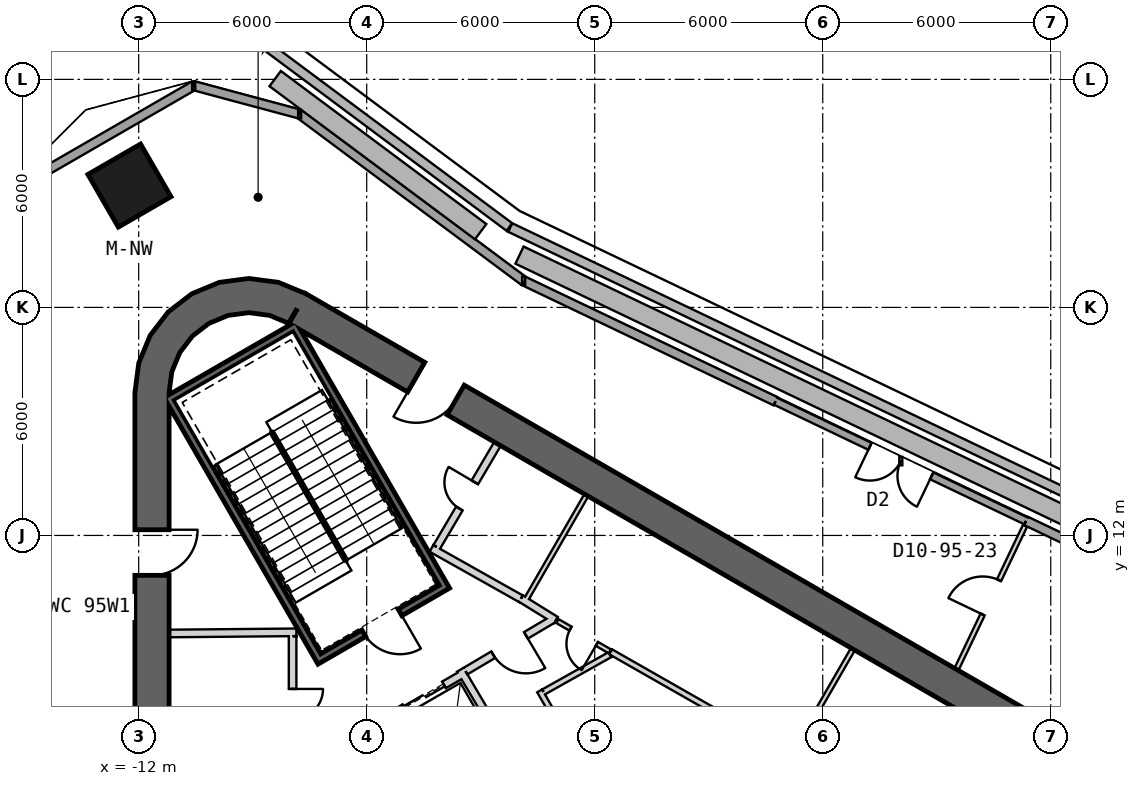
"""IFC4 building model, lengths in metres.
Left out: names, types, materials, properties, quantities, classifications, styles, units other than length and angle.
Written with IfcOpenShell. Run it as: python <this file> out.ifc"""

import sys

from ifc_helpers import new_model, si_unit, direction, frame, frame_2d, origin, origin_2d, place, context, subcontext, project, spatial, polyline, rectangle, outline, extrude, element, fill, save


model = new_model("IFC4")
c1 = context("Model", 3, precision=1e-05, world=origin(), true_north=direction((0.0, 1.0)))
c2 = subcontext(c1, "Body", "Model", "MODEL_VIEW")
j1 = project(units=[si_unit("LENGTHUNIT", "METRE"), si_unit("PLANEANGLEUNIT", "RADIAN")], contexts=[c1])
p1 = place(None, origin())
s1 = spatial("IfcSite", under=j1, at=p1, CompositionType="ELEMENT")
p2 = place(p1, origin())
s2 = spatial("IfcBuilding", under=s1, at=p2, CompositionType="ELEMENT")
p3 = place(p2, frame((0.0, 0.0, 420.3)))
s3 = spatial("IfcBuildingStorey", under=s2, at=p3, CompositionType="ELEMENT", Elevation=420.3)
p4 = place(p3, frame((-12.243, 21.206, -0.25), z_axis=(0.0, 0.0, 1.0), x_axis=(-0.5, 0.866025403784, 0.0)))
e1 = element("IfcColumn", 1, at=p4, inside=s3, PredefinedType="COLUMN", context=c2, shape_type="SweptSolid", body=[
    extrude(rectangle(XDim=1.6, YDim=1.6, at=origin_2d()), origin(), (0.0, 0.0, 1.0), 5.0),
])
p5 = place(p3, frame((19.475, 2.208, 0.0), z_axis=(0.0, 0.0, 1.0), x_axis=(-0.866028369851, 0.499994862586, 0.0)))
e2 = element("IfcWall", 2, at=p5, inside=s3, PredefinedType="SHEAR", context=c2, shape_type="SweptSolid", body=[
    extrude(rectangle(XDim=31.523, YDim=0.9, at=frame_2d((15.762, 0.0))), origin(), (0.0, 0.0, 1.0), 5.0),
])
p6 = place(p5, frame((3.612, 0.0, 0.0)))
e3 = element("IfcOpeningElement", 3, at=p6, cuts=e2, PredefinedType="OPENING", context=c2, shape_type="SweptSolid", body=[
    extrude(rectangle(XDim=1.2, YDim=2.4, at=frame_2d((0.6, 1.2))), frame((0.0, 0.46, 0.0), z_axis=(0.0, -1.0, 0.0), x_axis=(1.0, 0.0, 0.0)), (0.0, 0.0, 1.0), 0.92),
])
p7 = place(p5, frame((26.712, 0.0, 0.0)))
e4 = element("IfcOpeningElement", 4, at=p7, cuts=e2, PredefinedType="OPENING", context=c2, shape_type="SweptSolid", body=[
    extrude(rectangle(XDim=1.2, YDim=2.4, at=frame_2d((0.6, 1.2))), frame((0.0, 0.46, 0.0), z_axis=(0.0, -1.0, 0.0), x_axis=(1.0, 0.0, 0.0)), (0.0, 0.0, 1.0), 0.92),
])
p8 = place(p3, frame((-11.65, 15.762, 0.0), z_axis=(0.0, 0.0, 1.0), x_axis=(0.0, -1.0, 0.0)))
e5 = element("IfcWall", 5, at=p8, inside=s3, PredefinedType="SHEAR", context=c2, shape_type="SweptSolid", body=[
    extrude(rectangle(XDim=31.523, YDim=0.9, at=frame_2d((15.762, 0.0))), origin(), (0.0, 0.0, 1.0), 5.0),
])
p9 = place(p8, frame((3.612, 0.0, 0.0)))
e6 = element("IfcOpeningElement", 6, at=p9, cuts=e5, PredefinedType="OPENING", context=c2, shape_type="SweptSolid", body=[
    extrude(rectangle(XDim=1.2, YDim=2.4, at=frame_2d((0.6, 1.2))), frame((0.0, 0.46, 0.0), z_axis=(0.0, -1.0, 0.0), x_axis=(1.0, 0.0, 0.0)), (0.0, 0.0, 1.0), 0.92),
])
p10 = place(p8, frame((26.712, 0.0, 0.0)))
e7 = element("IfcOpeningElement", 7, at=p10, cuts=e5, PredefinedType="OPENING", context=c2, shape_type="SweptSolid", body=[
    extrude(rectangle(XDim=1.2, YDim=2.4, at=frame_2d((0.6, 1.2))), frame((0.0, 0.46, 0.0), z_axis=(0.0, -1.0, 0.0), x_axis=(1.0, 0.0, 0.0)), (0.0, 0.0, 1.0), 0.92),
])
p11 = place(p3, origin())
e8 = element("IfcWall", 8, at=p11, inside=s3, PredefinedType="SHEAR", context=c2, shape_type="SweptSolid", body=[
    extrude(outline(polyline([(-7.6, 18.36), (-8.323, 18.659), (-9.1, 18.762), (-9.876, 18.659), (-10.6, 18.36), (-11.221, 17.883), (-11.698, 17.262), (-11.998, 16.538), (-12.1, 15.762), (-11.2, 15.762), (-11.128, 16.305), (-10.919, 16.812), (-10.585, 17.247), (-10.15, 17.58), (-9.644, 17.79), (-9.1, 17.862), (-8.556, 17.79), (-8.05, 17.58), (-7.6, 18.36)])), origin(), (0.0, 0.0, 1.0), 5.0),
])
p12 = place(p3, frame((17.98, 9.214, 0.0), z_axis=(0.0, 0.0, 1.0), x_axis=(-0.90231860982, 0.431069746528, 0.0)))
e9 = element("IfcWall", 9, at=p12, inside=s3, PredefinedType="SOLIDWALL", context=c2, shape_type="SweptSolid", body=[
    extrude(rectangle(XDim=7.346, YDim=0.24, at=frame_2d((3.673, 0.0))), origin(), (0.0, 0.0, 1.0), 4.75),
])
p13 = place(p3, frame((4.758, 15.531, 0.0), z_axis=(0.0, 0.0, 1.0), x_axis=(-0.902312434085, 0.431082673389, 0.0)))
e10 = element("IfcWall", 10, at=p13, inside=s3, PredefinedType="SOLIDWALL", context=c2, shape_type="SweptSolid", body=[
    extrude(rectangle(XDim=7.346, YDim=0.24, at=frame_2d((3.673, 0.0))), origin(), (0.0, 0.0, 1.0), 4.75),
])
p14 = place(p3, frame((-1.87, 18.697, 0.0), z_axis=(0.0, 0.0, 1.0), x_axis=(-0.801980807662, 0.597349800488, 0.0)))
e11 = element("IfcWall", 11, at=p14, inside=s3, PredefinedType="SOLIDWALL", context=c2, shape_type="SweptSolid", body=[
    extrude(rectangle(XDim=7.349, YDim=0.24, at=frame_2d((3.675, 0.0))), origin(), (0.0, 0.0, 1.0), 4.75),
])
p15 = place(p3, frame((-7.764, 23.087, 0.0), z_axis=(0.0, 0.0, 1.0), x_axis=(-0.96591406393, 0.258862938836, 0.0)))
e12 = element("IfcWall", 12, at=p15, inside=s3, PredefinedType="SOLIDWALL", context=c2, shape_type="SweptSolid", body=[
    extrude(rectangle(XDim=2.886, YDim=0.24, at=frame_2d((1.443, 0.0))), origin(), (0.0, 0.0, 1.0), 4.75),
])
p16 = place(p3, frame((-10.552, 23.834, 0.0), z_axis=(0.0, 0.0, 1.0), x_axis=(-0.866034164019, -0.499984826521, 0.0)))
e13 = element("IfcWall", 13, at=p16, inside=s3, PredefinedType="SOLIDWALL", context=c2, shape_type="SweptSolid", body=[
    extrude(rectangle(XDim=5.558, YDim=0.24, at=frame_2d((2.779, 0.0))), origin(), (0.0, 0.0, 1.0), 4.75),
])
p17 = place(p3, frame((11.351, 12.381, 0.0), z_axis=(0.0, 0.0, 1.0), x_axis=(-0.902328654497, 0.431048720301, 0.0)))
e14 = element("IfcWall", 14, at=p17, inside=s3, PredefinedType="SOLIDWALL", context=c2, shape_type="SweptSolid", body=[
    extrude(rectangle(XDim=7.306, YDim=0.2, at=frame_2d((3.653, 0.0))), origin(), (0.0, 0.0, 1.0), 4.75),
])
p18 = place(p17, frame((2.753, 0.0, 0.0)))
e15 = element("IfcOpeningElement", 15, at=p18, cuts=e14, PredefinedType="OPENING", context=c2, shape_type="SweptSolid", body=[
    extrude(rectangle(XDim=1.8, YDim=2.4, at=frame_2d((0.9, 1.2))), frame((0.0, 0.11, 0.0), z_axis=(0.0, -1.0, 0.0), x_axis=(1.0, 0.0, 0.0)), (0.0, 0.0, 1.0), 0.22),
])
p19 = place(p3, frame((-8.626, 24.868, 0.04), z_axis=(0.0, 0.0, 1.0), x_axis=(0.801983693396, -0.597345926183, 0.0)))
e16 = element("IfcWall", 16, at=p19, inside=s3, PredefinedType="PARAPET", context=c2, shape_type="SweptSolid", body=[
    extrude(rectangle(XDim=7.958, YDim=0.25, at=frame_2d((3.979, 0.0))), origin(), (0.0, 0.0, 1.0), 1.2),
])
p20 = place(p3, frame((-2.224, 20.102, 0.04), z_axis=(0.0, 0.0, 1.0), x_axis=(0.902316737592, -0.43107366547, 0.0)))
e17 = element("IfcWall", 17, at=p20, inside=s3, PredefinedType="PARAPET", context=c2, shape_type="SweptSolid", body=[
    extrude(rectangle(XDim=24.007, YDim=0.25, at=frame_2d((12.004, 0.0))), origin(), (0.0, 0.0, 1.0), 1.2),
])
p21 = place(p3, frame((-8.408, 24.02, 0.04), z_axis=(0.0, 0.0, 1.0), x_axis=(0.801994390901, -0.597331563676, 0.0)))
e18 = element("IfcWall", 18, at=p21, inside=s3, PredefinedType="PARAPET", context=c2, shape_type="SweptSolid", body=[
    extrude(rectangle(XDim=6.742, YDim=0.5, at=frame_2d((3.371, 0.0))), origin(), (0.0, 0.0, 1.0), 0.6),
])
p22 = place(p3, frame((-1.979, 19.376, 0.04), z_axis=(0.0, 0.0, 1.0), x_axis=(0.902317634008, -0.431071789101, 0.0)))
e19 = element("IfcWall", 19, at=p22, inside=s3, PredefinedType="PARAPET", context=c2, shape_type="SweptSolid", body=[
    extrude(rectangle(XDim=22.832, YDim=0.5, at=frame_2d((11.416, 0.0))), origin(), (0.0, 0.0, 1.0), 0.6),
])
p23 = place(p3, frame((-11.245, 15.678, -0.25), z_axis=(0.0, 0.0, 1.0), x_axis=(0.499977274689, -0.866038523851, 0.0)))
e20 = element("IfcWall", 20, at=p23, inside=s3, PredefinedType="SHEAR", context=c2, shape_type="SweptSolid", body=[
    extrude(rectangle(XDim=8.1, YDim=0.2, at=frame_2d((4.05, 0.0))), origin(), (0.0, 0.0, 1.0), 5.0),
])
p24 = place(p3, frame((-7.818, 17.541, -0.25), z_axis=(0.0, 0.0, 1.0), x_axis=(-0.866044365799, -0.499967155389, 0.0)))
e21 = element("IfcWall", 21, at=p24, inside=s3, PredefinedType="SHEAR", context=c2, shape_type="SweptSolid", body=[
    extrude(rectangle(XDim=3.8, YDim=0.2, at=frame_2d((1.9, 0.0))), origin(), (0.0, 0.0, 1.0), 5.0),
])
p25 = place(p3, frame((-7.854, 17.405, -0.25), z_axis=(0.0, 0.0, 1.0), x_axis=(0.499997992926, -0.866026562566, 0.0)))
e22 = element("IfcWall", 22, at=p25, inside=s3, PredefinedType="SHEAR", context=c2, shape_type="SweptSolid", body=[
    extrude(rectangle(XDim=7.9, YDim=0.2, at=frame_2d((3.95, 0.0))), origin(), (0.0, 0.0, 1.0), 5.0),
])
p26 = place(p3, frame((-7.159, 8.8, -0.25), z_axis=(0.0, 0.0, 1.0), x_axis=(0.866047807691, 0.499961193289, 0.0)))
e23 = element("IfcWall", 23, at=p26, inside=s3, PredefinedType="SHEAR", context=c2, shape_type="SweptSolid", body=[
    extrude(rectangle(XDim=3.6, YDim=0.2, at=frame_2d((1.8, 0.0))), origin(), (0.0, 0.0, 1.0), 5.0),
])
p27 = place(p26, frame((1.25, 0.0, 0.25)))
e24 = element("IfcOpeningElement", 24, at=p27, cuts=e23, PredefinedType="OPENING", context=c2, shape_type="SweptSolid", body=[
    extrude(rectangle(XDim=1.1, YDim=2.1, at=frame_2d((0.55, 1.05))), frame((0.0, 0.11, 0.0), z_axis=(0.0, -1.0, 0.0), x_axis=(1.0, 0.0, 0.0)), (0.0, 0.0, 1.0), 0.22),
])
p28 = place(p3, frame((-5.524, 7.168, 0.0), z_axis=(0.0, 0.0, 1.0), x_axis=(0.866024647952, 0.500001309137, 0.0)))
e25 = element("IfcWall", 25, at=p28, inside=s3, PredefinedType="PLUMBINGWALL", context=c2, shape_type="SweptSolid", body=[
    extrude(rectangle(XDim=2.4, YDim=0.2, at=frame_2d((1.2, 0.0))), origin(), (0.0, 0.0, 1.0), 4.75),
])
p29 = place(p28, frame((0.6, 0.0, 0.0)))
e26 = element("IfcOpeningElement", 26, at=p29, cuts=e25, PredefinedType="OPENING", context=c2, shape_type="SweptSolid", body=[
    extrude(rectangle(XDim=1.2, YDim=2.4, at=frame_2d((0.6, 1.2))), frame((0.0, 0.11, 0.0), z_axis=(0.0, -1.0, 0.0), x_axis=(1.0, 0.0, 0.0)), (0.0, 0.0, 1.0), 0.22),
])
p30 = place(p3, frame((-3.538, 8.465, 0.0), z_axis=(0.0, 0.0, 1.0), x_axis=(0.508616218331, -0.860993346345, 0.0)))
e27 = element("IfcWall", 27, at=p30, inside=s3, PredefinedType="PLUMBINGWALL", context=c2, shape_type="SweptSolid", body=[
    extrude(rectangle(XDim=3.2, YDim=0.2, at=frame_2d((1.6, 0.0))), origin(), (0.0, 0.0, 1.0), 4.75),
])
p31 = place(p3, frame((-7.85, 9.451, 0.0), z_axis=(0.0, 0.0, 1.0), x_axis=(-0.999957167047, -0.009255488683, 0.0)))
e28 = element("IfcWall", 28, at=p31, inside=s3, PredefinedType="PARTITIONING", context=c2, shape_type="SweptSolid", body=[
    extrude(rectangle(XDim=3.35, YDim=0.2, at=frame_2d((1.675, 0.0))), origin(), (0.0, 0.0, 1.0), 4.75),
])
p32 = place(p3, frame((-7.95, 5.772, 0.0), z_axis=(0.0, 0.0, 1.0), x_axis=(0.0, 1.0, 0.0)))
e29 = element("IfcWall", 29, at=p32, inside=s3, PredefinedType="PARTITIONING", context=c2, shape_type="SweptSolid", body=[
    extrude(rectangle(XDim=3.578, YDim=0.2, at=frame_2d((1.789, 0.0))), origin(), (0.0, 0.0, 1.0), 4.75),
])
p33 = place(p32, frame((1.389, 0.0, 0.0)))
e30 = element("IfcOpeningElement", 30, at=p33, cuts=e29, PredefinedType="OPENING", context=c2, shape_type="SweptSolid", body=[
    extrude(rectangle(XDim=0.8, YDim=2.1, at=frame_2d((0.4, 1.05))), frame((0.0, 0.11, 0.0), z_axis=(0.0, -1.0, 0.0), x_axis=(1.0, 0.0, 0.0)), (0.0, 0.0, 1.0), 0.22),
])
p34 = place(p3, frame((6.795, 9.01, 0.0), z_axis=(0.0, 0.0, 1.0), x_axis=(-0.499984717929, -0.866034226713, 0.0)))
e31 = element("IfcWall", 31, at=p34, inside=s3, PredefinedType="PARTITIONING", context=c2, shape_type="SweptSolid", body=[
    extrude(rectangle(XDim=3.25, YDim=0.12, at=frame_2d((1.625, 0.0))), origin(), (0.0, 0.0, 1.0), 4.75),
])
p35 = place(p3, frame((-0.981, 9.746, 0.0), z_axis=(0.0, 0.0, 1.0), x_axis=(0.866019818373, -0.500009674092, 0.0)))
e32 = element("IfcWall", 32, at=p35, inside=s3, PredefinedType="PARTITIONING", context=c2, shape_type="SweptSolid", body=[
    extrude(rectangle(XDim=1.594, YDim=0.12, at=frame_2d((0.797, 0.0))), origin(), (0.0, 0.0, 1.0), 4.75),
])
p36 = place(p35, frame((0.397, 0.0, 0.0)))
e33 = element("IfcOpeningElement", 33, at=p36, cuts=e32, PredefinedType="OPENING", context=c2, shape_type="SweptSolid", body=[
    extrude(rectangle(XDim=0.8, YDim=2.1, at=frame_2d((0.4, 1.05))), frame((0.0, 0.07, 0.0), z_axis=(0.0, -1.0, 0.0), x_axis=(1.0, 0.0, 0.0)), (0.0, 0.0, 1.0), 0.14),
])
p37 = place(p3, frame((-0.22, 13.06, 0.0), z_axis=(0.0, 0.0, 1.0), x_axis=(-0.499984717929, -0.866034226713, 0.0)))
e34 = element("IfcWall", 34, at=p37, inside=s3, PredefinedType="PARTITIONING", context=c2, shape_type="SweptSolid", body=[
    extrude(rectangle(XDim=3.25, YDim=0.12, at=frame_2d((1.625, 0.0))), origin(), (0.0, 0.0, 1.0), 4.75),
])
p38 = place(p3, frame((-1.941, 10.339, 0.0), z_axis=(0.0, 0.0, 1.0), x_axis=(0.850216889117, -0.526432561171, 0.0)))
e35 = element("IfcWall", 35, at=p38, inside=s3, PredefinedType="PARTITIONING", context=c2, shape_type="SweptSolid", body=[
    extrude(rectangle(XDim=1.078, YDim=0.2, at=frame_2d((0.539, 0.0))), origin(), (0.0, 0.0, 1.0), 4.75),
])
p39 = place(p3, frame((5.159, 6.236, 0.0), z_axis=(0.0, 0.0, 1.0), x_axis=(-0.868754934783, 0.495242226886, 0.0)))
e36 = element("IfcWall", 36, at=p39, inside=s3, PredefinedType="PLUMBINGWALL", context=c2, shape_type="SweptSolid", body=[
    extrude(rectangle(XDim=5.455, YDim=0.15, at=frame_2d((2.728, 0.0))), origin(), (0.0, 0.0, 1.0), 4.75),
])
p40 = place(p3, frame((-4.296, 11.659, 0.0), z_axis=(0.0, 0.0, 1.0), x_axis=(0.871534483978, -0.490334215854, 0.0)))
e37 = element("IfcWall", 37, at=p40, inside=s3, PredefinedType="PARTITIONING", context=c2, shape_type="SweptSolid", body=[
    extrude(rectangle(XDim=2.7, YDim=0.2, at=frame_2d((1.35, 0.0))), origin(), (0.0, 0.0, 1.0), 4.75),
])
p41 = place(p3, frame((-2.558, 14.409, 0.0), z_axis=(0.0, 0.0, 1.0), x_axis=(-0.508018930956, -0.861345903683, 0.0)))
e38 = element("IfcWall", 38, at=p41, inside=s3, PredefinedType="PARTITIONING", context=c2, shape_type="SweptSolid", body=[
    extrude(rectangle(XDim=3.15, YDim=0.2, at=frame_2d((1.575, 0.0))), origin(), (0.0, 0.0, 1.0), 4.75),
])
p42 = place(p41, frame((1.175, 0.0, 0.0)))
e39 = element("IfcOpeningElement", 39, at=p42, cuts=e38, PredefinedType="OPENING", context=c2, shape_type="SweptSolid", body=[
    extrude(rectangle(XDim=0.8, YDim=2.1, at=frame_2d((0.4, 1.05))), frame((0.0, 0.11, 0.0), z_axis=(0.0, -1.0, 0.0), x_axis=(1.0, 0.0, 0.0)), (0.0, 0.0, 1.0), 0.22),
])
p43 = place(p3, frame((-1.069, 9.81, 0.0), z_axis=(0.0, 0.0, 1.0), x_axis=(-0.860617791406, -0.509251428192, 0.0)))
e40 = element("IfcWall", 40, at=p43, inside=s3, PredefinedType="PARTITIONING", context=c2, shape_type="SweptSolid", body=[
    extrude(rectangle(XDim=2.709, YDim=0.2, at=frame_2d((1.354, 0.0))), origin(), (0.0, 0.0, 1.0), 4.75),
])
p44 = place(p43, frame((0.861, 0.0, 0.0)))
e41 = element("IfcOpeningElement", 41, at=p44, cuts=e40, PredefinedType="OPENING", context=c2, shape_type="SweptSolid", body=[
    extrude(rectangle(XDim=1.0, YDim=2.1, at=frame_2d((0.5, 1.05))), frame((0.0, 0.11, 0.0), z_axis=(0.0, -1.0, 0.0), x_axis=(1.0, 0.0, 0.0)), (0.0, 0.0, 1.0), 0.22),
])
p45 = place(p3, frame((-1.449, 7.91, 0.0), z_axis=(0.0, 0.0, 1.0), x_axis=(0.499990139034, -0.866031096941, 0.0)))
e42 = element("IfcWall", 42, at=p45, inside=s3, PredefinedType="PLUMBINGWALL", context=c2, shape_type="SweptSolid", body=[
    extrude(rectangle(XDim=3.0, YDim=0.15, at=frame_2d((1.5, 0.0))), origin(), (0.0, 0.0, 1.0), 4.75),
])
p46 = place(p3, frame((0.399, 8.863, 0.0), z_axis=(0.0, 0.0, 1.0), x_axis=(-0.871829419551, -0.489809619348, 0.0)))
e43 = element("IfcWall", 43, at=p46, inside=s3, PredefinedType="PLUMBINGWALL", context=c2, shape_type="SweptSolid", body=[
    extrude(rectangle(XDim=2.002, YDim=0.15, at=frame_2d((1.001, 0.0))), origin(), (0.0, 0.0, 1.0), 4.75),
])
p47 = place(p3, frame((-14.708, 11.796, 0.0), z_axis=(0.0, 0.0, 1.0), x_axis=(0.07782131363, -0.996967323008, 0.0)))
e44 = element("IfcWall", 44, at=p47, inside=s3, PredefinedType="PARTITIONING", context=c2, shape_type="SweptSolid", body=[
    extrude(rectangle(XDim=8.0, YDim=0.12, at=frame_2d((4.0, 0.0))), origin(), (0.0, 0.0, 1.0), 4.75),
])
p48 = place(p3, frame((9.519, 8.476, 0.0), z_axis=(0.0, 0.0, 1.0), x_axis=(0.431123386303, 0.902292982231, 0.0)))
e45 = element("IfcWall", 45, at=p48, inside=s3, PredefinedType="PARTITIONING", context=c2, shape_type="SweptSolid", body=[
    extrude(rectangle(XDim=4.188, YDim=0.12, at=frame_2d((2.094, 0.0))), origin(), (0.0, 0.0, 1.0), 4.75),
])
p49 = place(p48, frame((1.6, 0.0, 0.0)))
e46 = element("IfcOpeningElement", 46, at=p49, cuts=e45, PredefinedType="OPENING", context=c2, shape_type="SweptSolid", body=[
    extrude(rectangle(XDim=1.0, YDim=2.1, at=frame_2d((0.5, 1.05))), frame((0.0, 0.07, 0.0), z_axis=(0.0, -1.0, 0.0), x_axis=(1.0, 0.0, 0.0)), (0.0, 0.0, 1.0), 0.14),
])
p50 = place(p18, frame((1.8, 0.0, 0.0), z_axis=(0.0, 0.0, 1.0), x_axis=(-1.0, 0.0, 0.0)))
e47 = element("IfcDoor", 47, at=p50, inside=s3, OperationType="SINGLE_SWING_RIGHT", PredefinedType="DOOR", context=c2, shape_type="SweptSolid", body=[
    extrude(rectangle(XDim=1.8, YDim=2.4, at=frame_2d((0.9, 1.2))), frame((0.0, 0.025, 0.0), z_axis=(0.0, -1.0, 0.0), x_axis=(1.0, 0.0, 0.0)), (0.0, 0.0, 1.0), 0.05),
])
fill(e15, e47)
p51 = place(p27, origin())
e48 = element("IfcDoor", 48, at=p51, inside=s3, OperationType="SINGLE_SWING_RIGHT", PredefinedType="USERDEFINED", context=c2, shape_type="SweptSolid", body=[
    extrude(rectangle(XDim=1.1, YDim=2.1, at=frame_2d((0.55, 1.05))), frame((0.0, 0.025, 0.0), z_axis=(0.0, -1.0, 0.0), x_axis=(1.0, 0.0, 0.0)), (0.0, 0.0, 1.0), 0.05),
])
fill(e24, e48)
p52 = place(p44, origin())
e49 = element("IfcDoor", 49, at=p52, inside=s3, OperationType="SINGLE_SWING_LEFT", PredefinedType="USERDEFINED", context=c2, shape_type="SweptSolid", body=[
    extrude(rectangle(XDim=1.0, YDim=2.1, at=frame_2d((0.5, 1.05))), frame((0.0, 0.025, 0.0), z_axis=(0.0, -1.0, 0.0), x_axis=(1.0, 0.0, 0.0)), (0.0, 0.0, 1.0), 0.05),
])
fill(e41, e49)
p53 = place(p29, origin())
e50 = element("IfcDoor", 50, at=p53, inside=s3, OperationType="SLIDING_TO_LEFT", PredefinedType="USERDEFINED", context=c2, shape_type="SweptSolid", body=[
    extrude(rectangle(XDim=1.2, YDim=2.4, at=frame_2d((0.6, 1.2))), frame((0.0, 0.025, 0.0), z_axis=(0.0, -1.0, 0.0), x_axis=(1.0, 0.0, 0.0)), (0.0, 0.0, 1.0), 0.05),
])
fill(e26, e50)
p54 = place(p33, origin())
e51 = element("IfcDoor", 51, at=p54, inside=s3, OperationType="SINGLE_SWING_RIGHT", PredefinedType="USERDEFINED", context=c2, shape_type="SweptSolid", body=[
    extrude(rectangle(XDim=0.8, YDim=2.1, at=frame_2d((0.4, 1.05))), frame((0.0, 0.025, 0.0), z_axis=(0.0, -1.0, 0.0), x_axis=(1.0, 0.0, 0.0)), (0.0, 0.0, 1.0), 0.05),
])
fill(e30, e51)
p55 = place(p36, origin())
e52 = element("IfcDoor", 52, at=p55, inside=s3, OperationType="SINGLE_SWING_RIGHT", PredefinedType="USERDEFINED", context=c2, shape_type="SweptSolid", body=[
    extrude(rectangle(XDim=0.8, YDim=2.1, at=frame_2d((0.4, 1.05))), frame((0.0, 0.025, 0.0), z_axis=(0.0, -1.0, 0.0), x_axis=(1.0, 0.0, 0.0)), (0.0, 0.0, 1.0), 0.05),
])
fill(e33, e52)
p56 = place(p42, origin())
e53 = element("IfcDoor", 53, at=p56, inside=s3, OperationType="SINGLE_SWING_LEFT", PredefinedType="USERDEFINED", context=c2, shape_type="SweptSolid", body=[
    extrude(rectangle(XDim=0.8, YDim=2.1, at=frame_2d((0.4, 1.05))), frame((0.0, 0.025, 0.0), z_axis=(0.0, -1.0, 0.0), x_axis=(1.0, 0.0, 0.0)), (0.0, 0.0, 1.0), 0.05),
])
fill(e39, e53)
p57 = place(p49, origin())
e54 = element("IfcDoor", 54, at=p57, inside=s3, OperationType="SINGLE_SWING_LEFT", PredefinedType="NOTDEFINED", context=c2, shape_type="SweptSolid", body=[
    extrude(rectangle(XDim=1.0, YDim=2.1, at=frame_2d((0.5, 1.05))), frame((0.0, 0.025, 0.0), z_axis=(0.0, -1.0, 0.0), x_axis=(1.0, 0.0, 0.0)), (0.0, 0.0, 1.0), 0.05),
])
fill(e46, e54)
p58 = place(p7, origin())
e55 = element("IfcDoor", 55, at=p58, inside=s3, OperationType="SINGLE_SWING_RIGHT", PredefinedType="USERDEFINED", context=c2, shape_type="SweptSolid", body=[
    extrude(rectangle(XDim=1.2, YDim=2.4, at=frame_2d((0.6, 1.2))), frame((0.0, 0.025, 0.0), z_axis=(0.0, -1.0, 0.0), x_axis=(1.0, 0.0, 0.0)), (0.0, 0.0, 1.0), 0.05),
])
fill(e4, e55)
p59 = place(p9, origin())
e56 = element("IfcDoor", 56, at=p59, inside=s3, OperationType="SINGLE_SWING_LEFT", PredefinedType="USERDEFINED", context=c2, shape_type="SweptSolid", body=[
    extrude(rectangle(XDim=1.2, YDim=2.4, at=frame_2d((0.6, 1.2))), frame((0.0, 0.025, 0.0), z_axis=(0.0, -1.0, 0.0), x_axis=(1.0, 0.0, 0.0)), (0.0, 0.0, 1.0), 0.05),
])
fill(e6, e56)
save(model, sys.argv[1])
